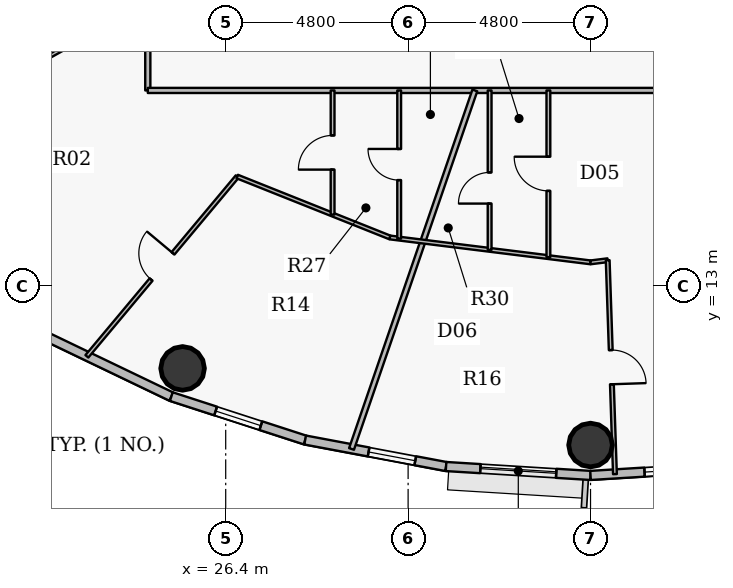
"""IFC4 building model, lengths in metres.
Left out: names, types, materials, properties, quantities, classifications, styles, units other than length and angle.
Written with IfcOpenShell. Run it as: python <this file> out.ifc"""

import sys

from ifc_helpers import new_model, si_unit, direction, frame, frame_2d, origin, origin_2d, place, context, subcontext, project, spatial, rectangle, hollow_circle, extrude, source, transform, mapped, element, fill, save


model = new_model("IFC4")
c1 = context("Model", 3, precision=1e-05, world=origin(), true_north=direction((0.0, 1.0)))
c2 = subcontext(c1, "Body", "Model", "MODEL_VIEW")
j1 = project(units=[si_unit("LENGTHUNIT", "METRE"), si_unit("PLANEANGLEUNIT", "RADIAN")], contexts=[c1])
p1 = place(None, origin())
s1 = spatial("IfcSite", under=j1, at=p1, CompositionType="ELEMENT")
p2 = place(p1, origin())
s2 = spatial("IfcBuilding", under=s1, at=p2, CompositionType="ELEMENT")
p3 = place(p2, frame((0.0, 0.0, 236.55)))
s3 = spatial("IfcBuildingStorey", under=s2, at=p3, CompositionType="ELEMENT", Elevation=236.55)
for number, where, z_axis, x_axis in (
    (1, (25.265, 10.836, 0.0), (0.0, 0.0, 1.0), (1.0, 0.0, 0.0)),
    (2, (36.0, 8.82, 0.0), (0.0, 0.0, 1.0), (1.0, 0.0, 0.0)),
):
    element("IfcColumn", number, at=place(p3, frame(where, z_axis=z_axis, x_axis=x_axis)), inside=s3, PredefinedType="COLUMN", context=c2, shape_type="SweptSolid", body=[
        extrude(hollow_circle(Radius=0.575, WallThickness=0.036, at=origin_2d()), origin(), (0.0, 0.0, 1.0), 3.75),
    ])
p4 = place(p3, frame((24.969, 10.094, 0.0), z_axis=(0.0, 0.0, 1.0), x_axis=(-0.901598104751, 0.432574684313, 0.0)))
e3 = element("IfcWall", 3, at=p4, inside=s3, PredefinedType="SOLIDWALL", context=c2, shape_type="SweptSolid", body=[
    extrude(rectangle(XDim=3.604, YDim=0.24, at=frame_2d((1.802, 0.0))), origin(), (0.0, 0.0, 1.0), 3.5),
])
p5 = place(p3, frame((28.491, 8.951, 0.0), z_axis=(0.0, 0.0, 1.0), x_axis=(-0.951210789182, 0.308541787354, 0.0)))
e4 = element("IfcWall", 4, at=p5, inside=s3, PredefinedType="SOLIDWALL", context=c2, shape_type="SweptSolid", body=[
    extrude(rectangle(XDim=3.702, YDim=0.24, at=frame_2d((1.851, 0.0))), origin(), (0.0, 0.0, 1.0), 3.5),
])
p6 = place(p5, frame((1.226, 0.0, 0.9)))
e5 = element("IfcOpeningElement", 5, at=p6, cuts=e4, PredefinedType="OPENING", context=c2, shape_type="SweptSolid", body=[
    extrude(rectangle(XDim=1.25, YDim=1.65, at=origin_2d()), frame((0.625, 0.13, 0.825), z_axis=(0.0, -1.0, 0.0), x_axis=(1.0, 0.0, 0.0)), (0.0, 0.0, 1.0), 0.26),
])
p7 = place(p3, frame((32.198, 8.254, 0.0), z_axis=(0.0, 0.0, 1.0), x_axis=(-0.982784898575, 0.184753465822, 0.0)))
e6 = element("IfcWall", 6, at=p7, inside=s3, PredefinedType="SOLIDWALL", context=c2, shape_type="SweptSolid", body=[
    extrude(rectangle(XDim=3.773, YDim=0.24, at=frame_2d((1.886, 0.0))), origin(), (0.0, 0.0, 1.0), 3.5),
])
p8 = place(p7, frame((0.824, 0.0, 0.9)))
e7 = element("IfcOpeningElement", 7, at=p8, cuts=e6, PredefinedType="OPENING", context=c2, shape_type="SweptSolid", body=[
    extrude(rectangle(XDim=1.25, YDim=1.65, at=origin_2d()), frame((0.625, 0.13, 0.825), z_axis=(0.0, -1.0, 0.0), x_axis=(1.0, 0.0, 0.0)), (0.0, 0.0, 1.0), 0.26),
])
p9 = place(p3, frame((36.0, 8.02, 0.0), z_axis=(0.0, 0.0, 1.0), x_axis=(-0.998108785312, 0.06147237333, 0.0)))
e8 = element("IfcWall", 8, at=p9, inside=s3, PredefinedType="SOLIDWALL", context=c2, shape_type="SweptSolid", body=[
    extrude(rectangle(XDim=3.809, YDim=0.24, at=frame_2d((1.904, 0.0))), origin(), (0.0, 0.0, 1.0), 3.5),
])
p10 = place(p9, frame((0.904, 0.0, 0.9)))
e9 = element("IfcOpeningElement", 9, at=p10, cuts=e8, PredefinedType="OPENING", context=c2, shape_type="SweptSolid", body=[
    extrude(rectangle(XDim=2.0, YDim=1.75, at=origin_2d()), frame((1.0, 0.13, 0.875), z_axis=(0.0, -1.0, 0.0), x_axis=(1.0, 0.0, 0.0)), (0.0, 0.0, 1.0), 0.26),
])
p11 = place(p3, frame((39.802, 8.254, 0.0), z_axis=(0.0, 0.0, 1.0), x_axis=(-0.998108785312, -0.06147237333, 0.0)))
e10 = element("IfcWall", 10, at=p11, inside=s3, PredefinedType="SOLIDWALL", context=c2, shape_type="SweptSolid", body=[
    extrude(rectangle(XDim=3.809, YDim=0.24, at=frame_2d((1.904, 0.0))), origin(), (0.0, 0.0, 1.0), 3.5),
])
p12 = place(p11, frame((0.785, 0.0, 0.9)))
e11 = element("IfcOpeningElement", 11, at=p12, cuts=e10, PredefinedType="OPENING", context=c2, shape_type="SweptSolid", body=[
    extrude(rectangle(XDim=1.6, YDim=1.75, at=origin_2d()), frame((0.8, 0.13, 0.875), z_axis=(0.0, -1.0, 0.0), x_axis=(1.0, 0.0, 0.0)), (0.0, 0.0, 1.0), 0.26),
])
p13 = place(p3, frame((16.25, 15.977, 0.0), z_axis=(0.0, 0.0, 1.0), x_axis=(0.87319302211, 0.487374543999, 0.0)))
e12 = element("IfcWall", 12, at=p13, inside=s3, PredefinedType="PARTITIONING", context=c2, shape_type="SweptSolid", body=[
    extrude(rectangle(XDim=6.712, YDim=0.1, at=frame_2d((3.356, 0.0))), origin(), (0.0, 0.0, 1.0), 2.985),
])
p14 = place(p13, frame((2.906, 0.0, 0.0)))
e13 = element("IfcOpeningElement", 13, at=p14, cuts=e12, PredefinedType="OPENING", context=c2, shape_type="SweptSolid", body=[
    extrude(rectangle(XDim=0.9, YDim=2.1, at=origin_2d()), frame((0.45, 0.06, 1.05), z_axis=(0.0, -1.0, 0.0), x_axis=(1.0, 0.0, 0.0)), (0.0, 0.0, 1.0), 0.12),
])
p15 = place(p3, frame((22.747, 11.154, 0.0), z_axis=(0.0, 0.0, 1.0), x_axis=(0.641565789242, 0.767068013982, 0.0)))
e14 = element("IfcWall", 14, at=p15, inside=s3, PredefinedType="PARTITIONING", context=c2, shape_type="SweptSolid", body=[
    extrude(rectangle(XDim=6.167, YDim=0.1, at=frame_2d((3.083, 0.0))), origin(), (0.0, 0.0, 1.0), 2.985),
])
p16 = place(p15, frame((2.633, 0.0, 0.0)))
e15 = element("IfcOpeningElement", 15, at=p16, cuts=e14, PredefinedType="OPENING", context=c2, shape_type="SweptSolid", body=[
    extrude(rectangle(XDim=0.9, YDim=2.1, at=origin_2d()), frame((0.45, 0.06, 1.05), z_axis=(0.0, -1.0, 0.0), x_axis=(1.0, 0.0, 0.0)), (0.0, 0.0, 1.0), 0.12),
])
p17 = place(p3, frame((24.35, 18.15, 0.0), z_axis=(0.0, 0.0, 1.0), x_axis=(0.0, 1.0, 0.0)))
e16 = element("IfcWall", 16, at=p17, inside=s3, PredefinedType="PARTITIONING", context=c2, shape_type="SweptSolid", body=[
    extrude(rectangle(XDim=7.163, YDim=0.135, at=frame_2d((3.581, 0.0))), origin(), (0.0, 0.0, 1.0), 2.935),
])
p18 = place(p17, frame((3.081, 0.0, 0.0)))
e17 = element("IfcOpeningElement", 17, at=p18, cuts=e16, PredefinedType="OPENING", context=c2, shape_type="SweptSolid", body=[
    extrude(rectangle(XDim=1.0, YDim=2.15, at=origin_2d()), frame((0.5, 0.078, 1.075), z_axis=(0.0, -1.0, 0.0), x_axis=(1.0, 0.0, 0.0)), (0.0, 0.0, 1.0), 0.155),
])
p19 = place(p3, frame((24.35, 18.15, 0.0), z_axis=(0.0, 0.0, 1.0), x_axis=(1.0, 0.0, 0.0)))
e18 = element("IfcWall", 18, at=p19, inside=s3, PredefinedType="PARTITIONING", context=c2, shape_type="SweptSolid", body=[
    extrude(rectangle(XDim=23.85, YDim=0.135, at=frame_2d((11.925, 0.0))), origin(), (0.0, 0.0, 1.0), 2.935),
])
p20 = place(p19, frame((14.838, 0.0, 0.0)))
e19 = element("IfcOpeningElement", 19, at=p20, cuts=e18, PredefinedType="OPENING", context=c2, shape_type="SweptSolid", body=[
    extrude(rectangle(XDim=1.0, YDim=2.15, at=origin_2d()), frame((0.5, 0.078, 1.075), z_axis=(0.0, -1.0, 0.0), x_axis=(1.0, 0.0, 0.0)), (0.0, 0.0, 1.0), 0.155),
])
p21 = place(p19, frame((21.472, 0.0, 0.0)))
e20 = element("IfcOpeningElement", 20, at=p21, cuts=e18, PredefinedType="OPENING", context=c2, shape_type="SweptSolid", body=[
    extrude(rectangle(XDim=1.0, YDim=2.15, at=origin_2d()), frame((0.5, 0.078, 1.075), z_axis=(0.0, -1.0, 0.0), x_axis=(1.0, 0.0, 0.0)), (0.0, 0.0, 1.0), 0.155),
])
p22 = place(p3, frame((26.703, 15.884, 0.0), z_axis=(0.0, 0.0, 1.0), x_axis=(0.928807108231, -0.370563564991, 0.0)))
e21 = element("IfcWall", 21, at=p22, inside=s3, PredefinedType="PARTITIONING", context=c2, shape_type="SweptSolid", body=[
    extrude(rectangle(XDim=4.327, YDim=0.1, at=frame_2d((2.163, 0.0))), origin(), (0.0, 0.0, 1.0), 2.935),
])
p23 = place(p3, frame((29.213, 14.883, 0.0), z_axis=(0.0, 0.0, 1.0), x_axis=(0.0, 1.0, 0.0)))
e22 = element("IfcWall", 22, at=p23, inside=s3, PredefinedType="PARTITIONING", context=c2, shape_type="SweptSolid", body=[
    extrude(rectangle(XDim=3.267, YDim=0.1, at=frame_2d((1.633, 0.0))), origin(), (0.0, 0.0, 1.0), 2.935),
])
p24 = place(p23, frame((1.183, 0.0, 0.0)))
e23 = element("IfcOpeningElement", 23, at=p24, cuts=e22, PredefinedType="OPENING", context=c2, shape_type="SweptSolid", body=[
    extrude(rectangle(XDim=0.9, YDim=2.1, at=origin_2d()), frame((0.45, 0.06, 1.05), z_axis=(0.0, -1.0, 0.0), x_axis=(1.0, 0.0, 0.0)), (0.0, 0.0, 1.0), 0.12),
])
p25 = place(p3, frame((29.711, 8.717, 0.0), z_axis=(0.0, 0.0, 1.0), x_axis=(0.325280852175, 0.945617452889, 0.0)))
e24 = element("IfcWall", 24, at=p25, inside=s3, PredefinedType="PARTITIONING", context=c2, shape_type="SweptSolid", body=[
    extrude(rectangle(XDim=9.976, YDim=0.135, at=frame_2d((4.988, 0.0))), origin(), (0.0, 0.0, 1.0), 2.985),
])
p26 = place(p3, frame((30.722, 14.281, 0.0), z_axis=(0.0, 0.0, 1.0), x_axis=(0.992398864395, -0.123062967412, 0.0)))
e25 = element("IfcWall", 25, at=p26, inside=s3, PredefinedType="PARTITIONING", context=c2, shape_type="SweptSolid", body=[
    extrude(rectangle(XDim=5.319, YDim=0.1, at=frame_2d((2.659, 0.0))), origin(), (0.0, 0.0, 1.0), 2.935),
])
p27 = place(p3, frame((30.965, 14.251, 0.0), z_axis=(0.0, 0.0, 1.0), x_axis=(0.0, 1.0, 0.0)))
e26 = element("IfcWall", 26, at=p27, inside=s3, PredefinedType="PARTITIONING", context=c2, shape_type="SweptSolid", body=[
    extrude(rectangle(XDim=3.899, YDim=0.1, at=frame_2d((1.949, 0.0))), origin(), (0.0, 0.0, 1.0), 3.5),
])
p28 = place(p27, frame((1.54, 0.0, 0.0)))
e27 = element("IfcOpeningElement", 27, at=p28, cuts=e26, PredefinedType="OPENING", context=c2, shape_type="SweptSolid", body=[
    extrude(rectangle(XDim=0.82, YDim=2.1, at=origin_2d()), frame((0.41, 0.06, 1.05), z_axis=(0.0, -1.0, 0.0), x_axis=(1.0, 0.0, 0.0)), (0.0, 0.0, 1.0), 0.12),
])
p29 = place(p3, frame((33.345, 13.956, 0.0), z_axis=(0.0, 0.0, 1.0), x_axis=(0.0, 1.0, 0.0)))
e28 = element("IfcWall", 28, at=p29, inside=s3, PredefinedType="PARTITIONING", context=c2, shape_type="SweptSolid", body=[
    extrude(rectangle(XDim=4.194, YDim=0.1, at=frame_2d((2.097, 0.0))), origin(), (0.0, 0.0, 1.0), 3.5),
])
p30 = place(p29, frame((1.217, 0.0, 0.0)))
e29 = element("IfcOpeningElement", 29, at=p30, cuts=e28, PredefinedType="OPENING", context=c2, shape_type="SweptSolid", body=[
    extrude(rectangle(XDim=0.82, YDim=2.1, at=origin_2d()), frame((0.41, 0.06, 1.05), z_axis=(0.0, -1.0, 0.0), x_axis=(1.0, 0.0, 0.0)), (0.0, 0.0, 1.0), 0.12),
])
p31 = place(p3, frame((34.891, 13.764, 0.0), z_axis=(0.0, 0.0, 1.0), x_axis=(0.0, 1.0, 0.0)))
e30 = element("IfcWall", 30, at=p31, inside=s3, PredefinedType="PARTITIONING", context=c2, shape_type="SweptSolid", body=[
    extrude(rectangle(XDim=4.386, YDim=0.1, at=frame_2d((2.193, 0.0))), origin(), (0.0, 0.0, 1.0), 3.5),
])
p32 = place(p31, frame((1.743, 0.0, 0.0)))
e31 = element("IfcOpeningElement", 31, at=p32, cuts=e30, PredefinedType="OPENING", context=c2, shape_type="SweptSolid", body=[
    extrude(rectangle(XDim=0.9, YDim=2.1, at=origin_2d()), frame((0.45, 0.06, 1.05), z_axis=(0.0, -1.0, 0.0), x_axis=(1.0, 0.0, 0.0)), (0.0, 0.0, 1.0), 0.12),
])
p33 = place(p3, frame((36.0, 13.626, 0.0), z_axis=(0.0, 0.0, 1.0), x_axis=(0.992368340182, 0.123308869931, 0.0)))
e32 = element("IfcWall", 32, at=p33, inside=s3, PredefinedType="PARTITIONING", context=c2, shape_type="SweptSolid", body=[
    extrude(rectangle(XDim=0.455, YDim=0.1, at=frame_2d((0.228, 0.0))), origin(), (0.0, 0.0, 1.0), 2.935),
])
p34 = place(p3, frame((36.452, 13.683, 0.0), z_axis=(0.0, 0.0, 1.0), x_axis=(0.033903801357, -0.999425100872, 0.0)))
e33 = element("IfcWall", 33, at=p34, inside=s3, PredefinedType="PARTITIONING", context=c2, shape_type="SweptSolid", body=[
    extrude(rectangle(XDim=5.631, YDim=0.1, at=frame_2d((2.815, 0.0))), origin(), (0.0, 0.0, 1.0), 2.985),
])
p35 = place(p34, frame((2.365, 0.0, 0.0)))
e34 = element("IfcOpeningElement", 34, at=p35, cuts=e33, PredefinedType="OPENING", context=c2, shape_type="SweptSolid", body=[
    extrude(rectangle(XDim=0.9, YDim=2.1, at=origin_2d()), frame((0.45, 0.06, 1.05), z_axis=(0.0, -1.0, 0.0), x_axis=(1.0, 0.0, 0.0)), (0.0, 0.0, 1.0), 0.12),
])
m1 = source(origin(), c2, "Body", "SweptSolid", [
    extrude(rectangle(XDim=1.25, YDim=1.65, at=origin_2d()), frame((0.625, 0.03, 0.825), z_axis=(0.0, -1.0, 0.0), x_axis=(1.0, 0.0, 0.0)), (0.0, 0.0, 1.0), 0.06),
])
p36 = place(p8, origin())
e35 = element("IfcWindow", 35, at=p36, inside=s3, PartitioningType="SINGLE_PANEL", PredefinedType="WINDOW", context=c2, shape_type="MappedRepresentation", body=[
    mapped(m1, transform((0.0, 0.0, 0.0), x_axis=(1.0, 0.0, 0.0), y_axis=(0.0, 1.0, 0.0), z_axis=(0.0, 0.0, 1.0), scale=1.0)),
])
fill(e7, e35)
m2 = source(origin(), c2, "Body", "SweptSolid", [
    extrude(rectangle(XDim=2.0, YDim=1.75, at=origin_2d()), frame((1.0, 0.03, 0.875), z_axis=(0.0, -1.0, 0.0), x_axis=(1.0, 0.0, 0.0)), (0.0, 0.0, 1.0), 0.06),
])
p37 = place(p10, origin())
e36 = element("IfcWindow", 36, at=p37, inside=s3, PartitioningType="DOUBLE_PANEL_VERTICAL", PredefinedType="WINDOW", context=c2, shape_type="MappedRepresentation", body=[
    mapped(m2, transform((0.0, 0.0, 0.0), x_axis=(1.0, 0.0, 0.0), y_axis=(0.0, 1.0, 0.0), z_axis=(0.0, 0.0, 1.0), scale=1.0)),
])
fill(e9, e36)
m3 = source(origin(), c2, "Body", "SweptSolid", [
    extrude(rectangle(XDim=1.6, YDim=1.75, at=origin_2d()), frame((0.8, 0.03, 0.875), z_axis=(0.0, -1.0, 0.0), x_axis=(1.0, 0.0, 0.0)), (0.0, 0.0, 1.0), 0.06),
])
p38 = place(p12, origin())
e37 = element("IfcWindow", 37, at=p38, inside=s3, PartitioningType="DOUBLE_PANEL_VERTICAL", PredefinedType="WINDOW", context=c2, shape_type="MappedRepresentation", body=[
    mapped(m3, transform((0.0, 0.0, 0.0), x_axis=(1.0, 0.0, 0.0), y_axis=(0.0, 1.0, 0.0), z_axis=(0.0, 0.0, 1.0), scale=1.0)),
])
fill(e11, e37)
p39 = place(p6, origin())
e38 = element("IfcWindow", 38, at=p39, inside=s3, PartitioningType="SINGLE_PANEL", PredefinedType="WINDOW", context=c2, shape_type="MappedRepresentation", body=[
    mapped(m1, transform((0.0, 0.0, 0.0), x_axis=(1.0, 0.0, 0.0), y_axis=(0.0, 1.0, 0.0), z_axis=(0.0, 0.0, 1.0), scale=1.0)),
])
fill(e5, e38)
m4 = source(origin(), c2, "Body", "SweptSolid", [
    extrude(rectangle(XDim=0.9, YDim=2.1, at=origin_2d()), frame((0.45, 0.025, 1.05), z_axis=(0.0, -1.0, 0.0), x_axis=(1.0, 0.0, 0.0)), (0.0, 0.0, 1.0), 0.05),
])
p40 = place(p16, origin())
e39 = element("IfcDoor", 39, at=p40, inside=s3, OperationType="SINGLE_SWING_RIGHT", PredefinedType="DOOR", context=c2, shape_type="MappedRepresentation", body=[
    mapped(m4, transform((0.0, 0.0, 0.0), x_axis=(1.0, 0.0, 0.0), y_axis=(0.0, 1.0, 0.0), z_axis=(0.0, 0.0, 1.0), scale=1.0)),
])
fill(e15, e39)
p41 = place(p24, origin())
e40 = element("IfcDoor", 40, at=p41, inside=s3, OperationType="SINGLE_SWING_LEFT", PredefinedType="DOOR", context=c2, shape_type="MappedRepresentation", body=[
    mapped(m4, transform((0.0, 0.0, 0.0), x_axis=(1.0, 0.0, 0.0), y_axis=(0.0, 1.0, 0.0), z_axis=(0.0, 0.0, 1.0), scale=1.0)),
])
fill(e23, e40)
m5 = source(origin(), c2, "Body", "SweptSolid", [
    extrude(rectangle(XDim=0.82, YDim=2.1, at=origin_2d()), frame((0.41, 0.025, 1.05), z_axis=(0.0, -1.0, 0.0), x_axis=(1.0, 0.0, 0.0)), (0.0, 0.0, 1.0), 0.05),
])
p42 = place(p28, origin())
e41 = element("IfcDoor", 41, at=p42, inside=s3, OperationType="SINGLE_SWING_RIGHT", PredefinedType="DOOR", context=c2, shape_type="MappedRepresentation", body=[
    mapped(m5, transform((0.0, 0.0, 0.0), x_axis=(1.0, 0.0, 0.0), y_axis=(0.0, 1.0, 0.0), z_axis=(0.0, 0.0, 1.0), scale=1.0)),
])
fill(e27, e41)
p43 = place(p35, origin())
e42 = element("IfcDoor", 42, at=p43, inside=s3, OperationType="SINGLE_SWING_RIGHT", PredefinedType="DOOR", context=c2, shape_type="MappedRepresentation", body=[
    mapped(m4, transform((0.0, 0.0, 0.0), x_axis=(1.0, 0.0, 0.0), y_axis=(0.0, 1.0, 0.0), z_axis=(0.0, 0.0, 1.0), scale=1.0)),
])
fill(e34, e42)
p44 = place(p32, origin())
e43 = element("IfcDoor", 43, at=p44, inside=s3, OperationType="SINGLE_SWING_RIGHT", PredefinedType="DOOR", context=c2, shape_type="MappedRepresentation", body=[
    mapped(m4, transform((0.0, 0.0, 0.0), x_axis=(1.0, 0.0, 0.0), y_axis=(0.0, 1.0, 0.0), z_axis=(0.0, 0.0, 1.0), scale=1.0)),
])
fill(e31, e43)
p45 = place(p30, origin())
e44 = element("IfcDoor", 44, at=p45, inside=s3, OperationType="SINGLE_SWING_LEFT", PredefinedType="DOOR", context=c2, shape_type="MappedRepresentation", body=[
    mapped(m5, transform((0.0, 0.0, 0.0), x_axis=(1.0, 0.0, 0.0), y_axis=(0.0, 1.0, 0.0), z_axis=(0.0, 0.0, 1.0), scale=1.0)),
])
fill(e29, e44)
save(model, sys.argv[1])
